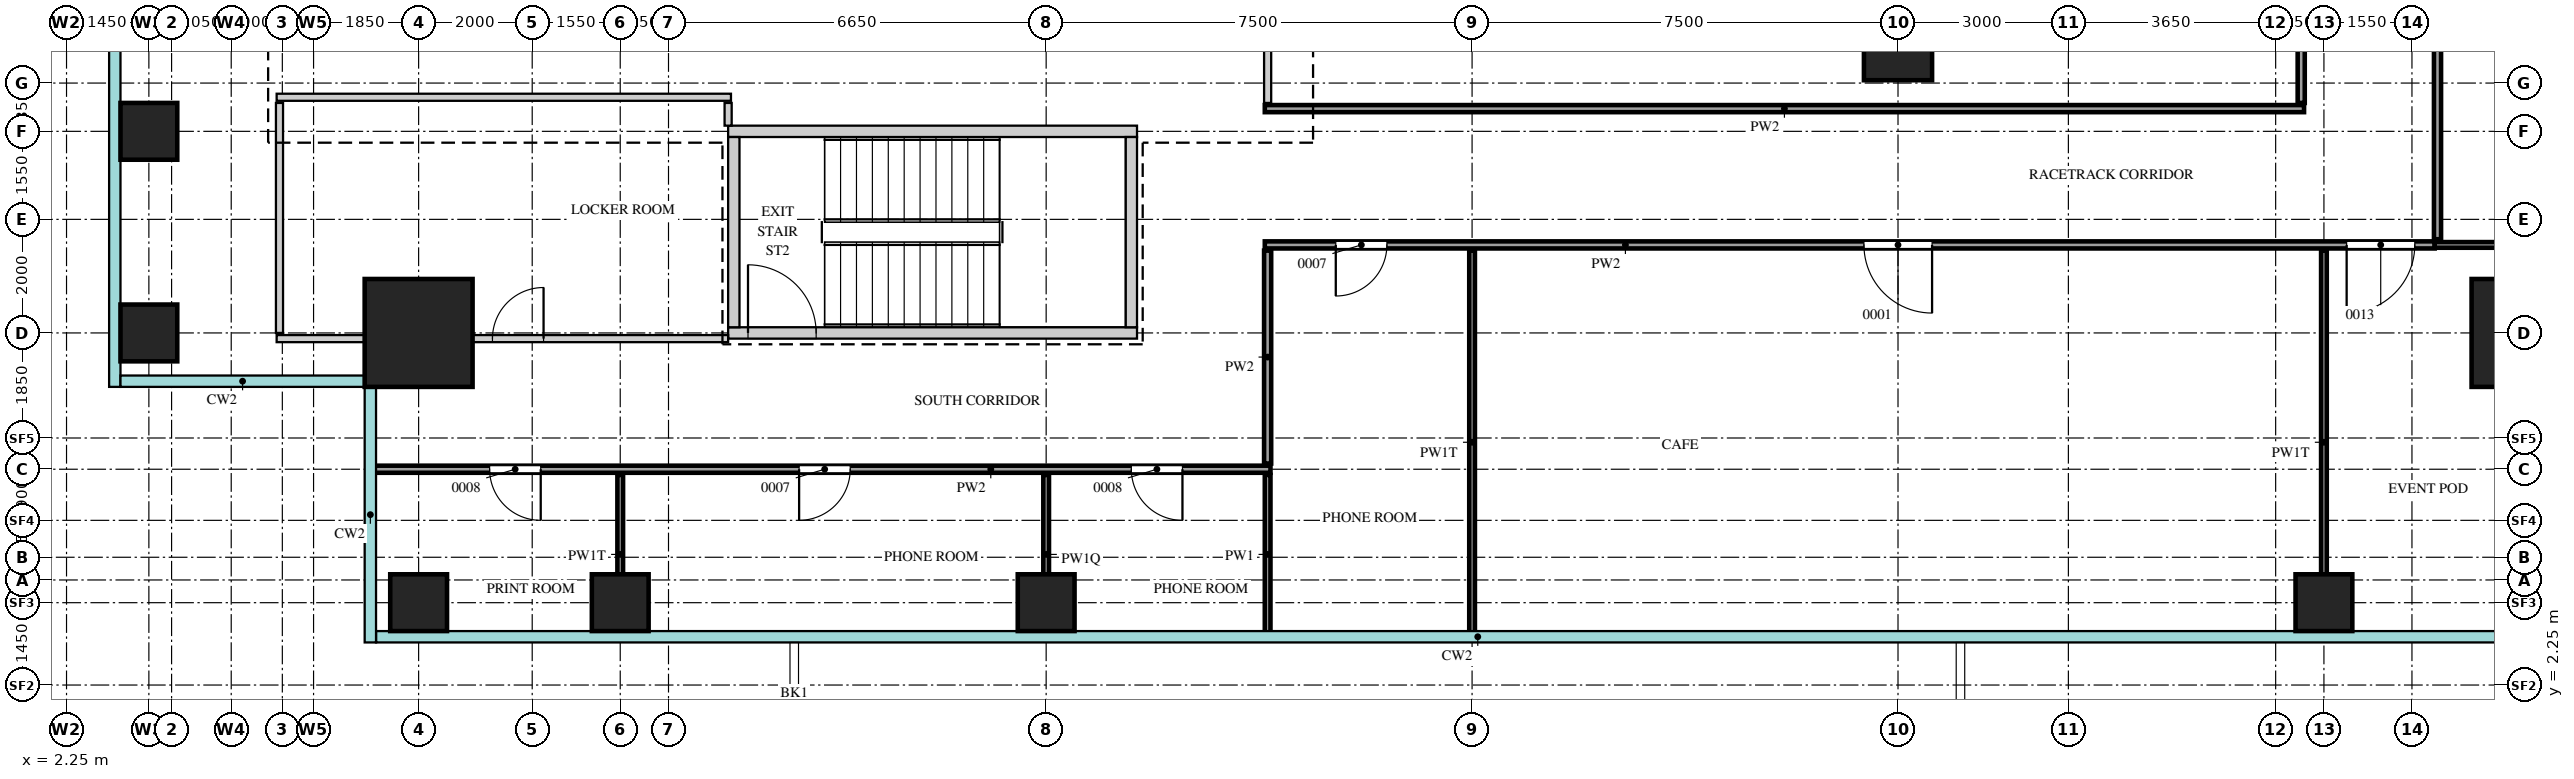
"""IFC4 building model, lengths in metres.
Left out: names, types, materials, properties, quantities, classifications, styles, units other than length and angle.
Written with IfcOpenShell. Run it as: python <this file> out.ifc"""

import sys

from ifc_helpers import new_model, si_unit, direction, frame, frame_2d, origin, origin_2d, place, context, subcontext, project, spatial, rectangle, extrude, source, transform, mapped, element, fill, save


model = new_model("IFC4")
c1 = context("Model", 3, precision=1e-05, world=origin(), true_north=direction((0.0, 1.0)))
c2 = subcontext(c1, "Body", "Model", "MODEL_VIEW")
j1 = project(units=[si_unit("LENGTHUNIT", "METRE"), si_unit("PLANEANGLEUNIT", "RADIAN")], contexts=[c1])
p1 = place(None, origin())
s1 = spatial("IfcSite", under=j1, at=p1, CompositionType="ELEMENT")
p2 = place(p1, origin())
s2 = spatial("IfcBuilding", under=s1, at=p2, CompositionType="ELEMENT")
p3 = place(p2, frame((0.0, 0.0, 192.7)))
s3 = spatial("IfcBuildingStorey", under=s2, at=p3, CompositionType="ELEMENT", Elevation=192.7)
m1 = source(origin(), c2, "Body", "SweptSolid", [
    extrude(rectangle(XDim=7.2, YDim=0.2, at=frame_2d((3.6, 0.0))), origin(), (0.0, 0.0, 1.0), 3.75),
])
p4 = place(p3, frame((13.9, 12.0, 0.0), z_axis=(0.0, 0.0, 1.0), x_axis=(1.0, 0.0, 0.0)))
e1 = element("IfcWall", 1, at=p4, inside=s3, PredefinedType="SHEAR", context=c2, shape_type="MappedRepresentation", body=[
    mapped(m1, transform((0.0, 0.0, 0.0))),
])
p5 = place(p3, frame((13.9, 8.45, 0.0), z_axis=(0.0, 0.0, 1.0), x_axis=(1.0, 0.0, 0.0)))
e2 = element("IfcWall", 2, at=p5, inside=s3, PredefinedType="SHEAR", context=c2, shape_type="MappedRepresentation", body=[
    mapped(m1, transform((0.0, 0.0, 0.0))),
])
m2 = source(origin(), c2, "Body", "SweptSolid", [
    extrude(rectangle(XDim=1.2, YDim=2.1, at=frame_2d((0.6, 1.05))), frame((0.0, 0.11, 0.0), z_axis=(0.0, -1.0, 0.0), x_axis=(1.0, 0.0, 0.0)), (0.0, 0.0, 1.0), 0.22),
])
p6 = place(p5, frame((0.35, 0.0, 0.0)))
e3 = element("IfcOpeningElement", 3, at=p6, cuts=e2, PredefinedType="OPENING", context=c2, shape_type="MappedRepresentation", body=[
    mapped(m2, transform((0.0, 0.0, 0.0))),
])
m3 = source(origin(), c2, "Body", "SweptSolid", [
    extrude(rectangle(XDim=3.35, YDim=0.2, at=frame_2d((1.675, 0.0))), origin(), (0.0, 0.0, 1.0), 3.75),
])
for number, where, z_axis, x_axis in (
    (4, (21.0, 8.55, 0.0), (0.0, 0.0, 1.0), (0.0, 1.0, 0.0)),
    (5, (14.0, 8.55, 0.0), (0.0, 0.0, 1.0), (0.0, 1.0, 0.0)),
):
    element("IfcWall", number, at=place(p3, frame(where, z_axis=z_axis, x_axis=x_axis)), inside=s3, PredefinedType="SHEAR", context=c2, shape_type="MappedRepresentation", body=[
        mapped(m3, transform((0.0, 0.0, 0.0))),
    ])
m4 = source(origin(), c2, "Body", "SweptSolid", [
    extrude(rectangle(XDim=1.9, YDim=1.9, at=origin_2d()), origin(), (0.0, 0.0, 1.0), 4.0),
])
for number, where, z_axis, x_axis in (
    (6, (45.55, 8.45, 0.0), (0.0, 0.0, 1.0), (1.0, 0.0, 0.0)),
    (7, (8.45, 8.45, 0.0), (0.0, 0.0, 1.0), (1.0, 0.0, 0.0)),
):
    element("IfcColumn", number, at=place(p3, frame(where, z_axis=z_axis, x_axis=x_axis)), inside=s3, PredefinedType="COLUMN", context=c2, shape_type="MappedRepresentation", body=[
        mapped(m4, transform((0.0, 0.0, 0.0))),
    ])
m5 = source(origin(), c2, "Body", "SweptSolid", [
    extrude(rectangle(XDim=1.0, YDim=1.0, at=origin_2d()), origin(), (0.0, 0.0, 1.0), 3.75),
])
for number, where, z_axis, x_axis in (
    (8, (8.45, 3.7, 0.0), (0.0, 0.0, 1.0), (1.0, 0.0, 0.0)),
    (9, (12.0, 3.7, 0.0), (0.0, 0.0, 1.0), (1.0, 0.0, 0.0)),
    (10, (19.5, 3.7, 0.0), (0.0, 0.0, 1.0), (1.0, 0.0, 0.0)),
    (11, (42.0, 3.7, 0.0), (0.0, 0.0, 1.0), (1.0, 0.0, 0.0)),
    (12, (3.7, 8.45, 0.0), (0.0, 0.0, 1.0), (1.0, 0.0, 0.0)),
    (13, (3.7, 12.0, 0.0), (0.0, 0.0, 1.0), (1.0, 0.0, 0.0)),
):
    element("IfcColumn", number, at=place(p3, frame(where, z_axis=z_axis, x_axis=x_axis)), inside=s3, PredefinedType="COLUMN", context=c2, shape_type="MappedRepresentation", body=[
        mapped(m5, transform((0.0, 0.0, 0.0))),
    ])
m6 = source(origin(), c2, "Body", "SweptSolid", [
    extrude(rectangle(XDim=1.2, YDim=1.2, at=origin_2d()), origin(), (0.0, 0.0, 1.0), 3.75),
])
p7 = place(p3, frame((34.5, 13.5, 0.0), z_axis=(0.0, 0.0, 1.0), x_axis=(1.0, 0.0, 0.0)))
e14 = element("IfcColumn", 14, at=p7, inside=s3, PredefinedType="COLUMN", context=c2, shape_type="MappedRepresentation", body=[
    mapped(m6, transform((0.0, 0.0, 0.0))),
])
m7 = source(origin(), c2, "Body", "SweptSolid", [
    extrude(rectangle(XDim=2.8, YDim=0.1, at=frame_2d((1.4, 0.0))), origin(), (0.0, 0.0, 1.0), 3.3),
])
p8 = place(p3, frame((12.0, 3.15, 0.0), z_axis=(0.0, 0.0, 1.0), x_axis=(0.0, 1.0, 0.0)))
e15 = element("IfcWall", 15, at=p8, inside=s3, PredefinedType="PARTITIONING", context=c2, shape_type="MappedRepresentation", body=[
    mapped(m7, transform((0.0, 0.0, 0.0))),
])
m8 = source(origin(), c2, "Body", "SweptSolid", [
    extrude(rectangle(XDim=2.8, YDim=0.1, at=frame_2d((1.4, 0.0))), origin(), (0.0, 0.0, 1.0), 3.42),
])
p9 = place(p3, frame((19.5, 3.15, 0.0), z_axis=(0.0, 0.0, 1.0), x_axis=(0.0, 1.0, 0.0)))
e16 = element("IfcWall", 16, at=p9, inside=s3, PredefinedType="PARTITIONING", context=c2, shape_type="MappedRepresentation", body=[
    mapped(m8, transform((0.0, 0.0, 0.0))),
])
m9 = source(origin(), c2, "Body", "SweptSolid", [
    extrude(rectangle(XDim=2.8, YDim=0.1, at=frame_2d((1.4, 0.0))), origin(), (0.0, 0.0, 1.0), 3.8),
])
p10 = place(p3, frame((23.4, 3.15, 0.0), z_axis=(0.0, 0.0, 1.0), x_axis=(0.0, 1.0, 0.0)))
e17 = element("IfcWall", 17, at=p10, inside=s3, PredefinedType="PARTITIONING", context=c2, shape_type="MappedRepresentation", body=[
    mapped(m9, transform((0.0, 0.0, 0.0))),
])
m10 = source(origin(), c2, "Body", "SweptSolid", [
    extrude(rectangle(XDim=6.75, YDim=0.1, at=frame_2d((3.375, 0.0))), origin(), (0.0, 0.0, 1.0), 3.3),
])
for number, where, z_axis, x_axis in (
    (18, (27.0, 3.15, 0.0), (0.0, 0.0, 1.0), (0.0, 1.0, 0.0)),
    (19, (42.0, 3.15, 0.0), (0.0, 0.0, 1.0), (0.0, 1.0, 0.0)),
):
    element("IfcWall", number, at=place(p3, frame(where, z_axis=z_axis, x_axis=x_axis)), inside=s3, PredefinedType="PARTITIONING", context=c2, shape_type="MappedRepresentation", body=[
        mapped(m10, transform((0.0, 0.0, 0.0))),
    ])
m11 = source(origin(), c2, "Body", "SweptSolid", [
    extrude(rectangle(XDim=15.8, YDim=0.125, at=frame_2d((7.9, 0.0))), origin(), (0.0, 0.0, 1.0), 3.8),
])
p11 = place(p3, frame((7.65, 6.05, 0.0), z_axis=(0.0, 0.0, 1.0), x_axis=(1.0, 0.0, 0.0)))
e20 = element("IfcWall", 20, at=p11, inside=s3, PredefinedType="PARTITIONING", context=c2, shape_type="MappedRepresentation", body=[
    mapped(m11, transform((0.0, 0.0, 0.0))),
])
m12 = source(origin(), c2, "Body", "SweptSolid", [
    extrude(rectangle(XDim=0.9, YDim=2.1, at=frame_2d((0.45, 1.05))), frame((0.0, 0.073, 0.0), z_axis=(0.0, -1.0, 0.0), x_axis=(1.0, 0.0, 0.0)), (0.0, 0.0, 1.0), 0.145),
])
p12 = place(p11, frame((2.05, 0.0, 0.0)))
e21 = element("IfcOpeningElement", 21, at=p12, cuts=e20, PredefinedType="OPENING", context=c2, shape_type="MappedRepresentation", body=[
    mapped(m12, transform((0.0, 0.0, 0.0))),
])
p13 = place(p11, frame((7.5, 0.0, 0.0)))
e22 = element("IfcOpeningElement", 22, at=p13, cuts=e20, PredefinedType="OPENING", context=c2, shape_type="MappedRepresentation", body=[
    mapped(m12, transform((0.0, 0.0, 0.0))),
])
p14 = place(p11, frame((13.35, 0.0, 0.0)))
e23 = element("IfcOpeningElement", 23, at=p14, cuts=e20, PredefinedType="OPENING", context=c2, shape_type="MappedRepresentation", body=[
    mapped(m12, transform((0.0, 0.0, 0.0))),
])
m13 = source(origin(), c2, "Body", "SweptSolid", [
    extrude(rectangle(XDim=3.75, YDim=0.125, at=frame_2d((1.875, 0.0))), origin(), (0.0, 0.0, 1.0), 3.8),
])
p15 = place(p3, frame((23.4, 6.15, 0.0), z_axis=(0.0, 0.0, 1.0), x_axis=(0.0, 1.0, 0.0)))
e24 = element("IfcWall", 24, at=p15, inside=s3, PredefinedType="PARTITIONING", context=c2, shape_type="MappedRepresentation", body=[
    mapped(m13, transform((0.0, 0.0, 0.0))),
])
m14 = source(origin(), c2, "Body", "SweptSolid", [
    extrude(rectangle(XDim=7.95, YDim=0.125, at=frame_2d((3.975, 0.0))), origin(), (0.0, 0.0, 1.0), 3.25),
])
p16 = place(p3, frame((5.95, 8.35, 0.0), z_axis=(0.0, 0.0, 1.0), x_axis=(1.0, 0.0, 0.0)))
e25 = element("IfcWall", 25, at=p16, inside=s3, PredefinedType="PARTITIONING", context=c2, shape_type="MappedRepresentation", body=[
    mapped(m14, transform((0.0, 0.0, 0.0))),
])
p17 = place(p16, frame((3.8, 0.0, 0.0)))
e26 = element("IfcOpeningElement", 26, at=p17, cuts=e25, PredefinedType="OPENING", context=c2, shape_type="MappedRepresentation", body=[
    mapped(m12, transform((0.0, 0.0, 0.0))),
])
m15 = source(origin(), c2, "Body", "SweptSolid", [
    extrude(rectangle(XDim=4.05, YDim=0.125, at=frame_2d((2.025, 0.0))), origin(), (0.0, 0.0, 1.0), 3.8),
])
p18 = place(p3, frame((6.0, 8.45, 0.0), z_axis=(0.0, 0.0, 1.0), x_axis=(0.0, 1.0, 0.0)))
e27 = element("IfcWall", 27, at=p18, inside=s3, PredefinedType="PARTITIONING", context=c2, shape_type="MappedRepresentation", body=[
    mapped(m15, transform((0.0, 0.0, 0.0))),
])
m16 = source(origin(), c2, "Body", "SweptSolid", [
    extrude(rectangle(XDim=20.6, YDim=0.125, at=frame_2d((10.3, 0.0))), origin(), (0.0, 0.0, 1.0), 3.8),
])
p19 = place(p3, frame((23.35, 10.0, 0.0), z_axis=(0.0, 0.0, 1.0), x_axis=(1.0, 0.0, 0.0)))
e28 = element("IfcWall", 28, at=p19, inside=s3, PredefinedType="PARTITIONING", context=c2, shape_type="MappedRepresentation", body=[
    mapped(m16, transform((0.0, 0.0, 0.0))),
])
p20 = place(p19, frame((1.25, 0.0, 0.0)))
e29 = element("IfcOpeningElement", 29, at=p20, cuts=e28, PredefinedType="OPENING", context=c2, shape_type="MappedRepresentation", body=[
    mapped(m12, transform((0.0, 0.0, 0.0))),
])
m17 = source(origin(), c2, "Body", "SweptSolid", [
    extrude(rectangle(XDim=1.2, YDim=2.1, at=frame_2d((0.6, 1.05))), frame((0.0, 0.073, 0.0), z_axis=(0.0, -1.0, 0.0), x_axis=(1.0, 0.0, 0.0)), (0.0, 0.0, 1.0), 0.145),
])
p21 = place(p19, frame((10.55, 0.0, 0.0)))
e30 = element("IfcOpeningElement", 30, at=p21, cuts=e28, PredefinedType="OPENING", context=c2, shape_type="MappedRepresentation", body=[
    mapped(m17, transform((0.0, 0.0, 0.0))),
])
p22 = place(p19, frame((19.05, 0.0, 0.0)))
e31 = element("IfcOpeningElement", 31, at=p22, cuts=e28, PredefinedType="OPENING", context=c2, shape_type="MappedRepresentation", body=[
    mapped(m17, transform((0.0, 0.0, 0.0))),
])
m18 = source(origin(), c2, "Body", "SweptSolid", [
    extrude(rectangle(XDim=6.9, YDim=0.1, at=frame_2d((3.45, 0.0))), origin(), (0.0, 0.0, 1.0), 3.8),
])
p23 = place(p3, frame((43.95, 10.0, 0.0), z_axis=(0.0, 0.0, 1.0), x_axis=(1.0, 0.0, 0.0)))
e32 = element("IfcWall", 32, at=p23, inside=s3, PredefinedType="PARTITIONING", context=c2, shape_type="MappedRepresentation", body=[
    mapped(m18, transform((0.0, 0.0, 0.0))),
])
m19 = source(origin(), c2, "Body", "SweptSolid", [
    extrude(rectangle(XDim=33.8, YDim=0.125, at=frame_2d((16.9, 0.0))), origin(), (0.0, 0.0, 1.0), 3.8),
])
p24 = place(p3, frame((44.0, 10.1, 0.0), z_axis=(0.0, 0.0, 1.0), x_axis=(0.0, 1.0, 0.0)))
e33 = element("IfcWall", 33, at=p24, inside=s3, PredefinedType="PARTITIONING", context=c2, shape_type="MappedRepresentation", body=[
    mapped(m19, transform((0.0, 0.0, 0.0))),
])
p25 = place(p24, frame((5.25, 0.0, 0.0)))
e34 = element("IfcOpeningElement", 34, at=p25, cuts=e33, PredefinedType="OPENING", context=c2, shape_type="MappedRepresentation", body=[
    mapped(m12, transform((0.0, 0.0, 0.0))),
])
p26 = place(p24, frame((12.55, 0.0, 0.0)))
e35 = element("IfcOpeningElement", 35, at=p26, cuts=e33, PredefinedType="OPENING", context=c2, shape_type="MappedRepresentation", body=[
    mapped(m12, transform((0.0, 0.0, 0.0))),
])
p27 = place(p24, frame((23.6, 0.0, 0.0)))
e36 = element("IfcOpeningElement", 36, at=p27, cuts=e33, PredefinedType="OPENING", context=c2, shape_type="MappedRepresentation", body=[
    mapped(m12, transform((0.0, 0.0, 0.0))),
])
p28 = place(p24, frame((32.3, 0.0, 0.0)))
e37 = element("IfcOpeningElement", 37, at=p28, cuts=e33, PredefinedType="OPENING", context=c2, shape_type="MappedRepresentation", body=[
    mapped(m12, transform((0.0, 0.0, 0.0))),
])
m20 = source(origin(), c2, "Body", "SweptSolid", [
    extrude(rectangle(XDim=0.4, YDim=0.125, at=frame_2d((0.2, 0.0))), origin(), (0.0, 0.0, 1.0), 3.8),
])
p29 = place(p3, frame((13.9, 12.1, 0.0), z_axis=(0.0, 0.0, 1.0), x_axis=(0.0, 1.0, 0.0)))
e38 = element("IfcWall", 38, at=p29, inside=s3, PredefinedType="PARTITIONING", context=c2, shape_type="MappedRepresentation", body=[
    mapped(m20, transform((0.0, 0.0, 0.0))),
])
m21 = source(origin(), c2, "Body", "SweptSolid", [
    extrude(rectangle(XDim=18.3, YDim=0.125, at=frame_2d((9.15, 0.0))), origin(), (0.0, 0.0, 1.0), 3.8),
])
p30 = place(p3, frame((23.35, 12.4, 0.0), z_axis=(0.0, 0.0, 1.0), x_axis=(1.0, 0.0, 0.0)))
e39 = element("IfcWall", 39, at=p30, inside=s3, PredefinedType="PARTITIONING", context=c2, shape_type="MappedRepresentation", body=[
    mapped(m21, transform((0.0, 0.0, 0.0))),
])
m22 = source(origin(), c2, "Body", "SweptSolid", [
    extrude(rectangle(XDim=23.4, YDim=0.125, at=frame_2d((11.7, 0.0))), origin(), (0.0, 0.0, 1.0), 3.8),
])
p31 = place(p3, frame((23.4, 12.5, 0.0), z_axis=(0.0, 0.0, 1.0), x_axis=(0.0, 1.0, 0.0)))
e40 = element("IfcWall", 40, at=p31, inside=s3, PredefinedType="PARTITIONING", context=c2, shape_type="MappedRepresentation", body=[
    mapped(m22, transform((0.0, 0.0, 0.0))),
])
p32 = place(p31, frame((6.6, 0.0, 0.0)))
e41 = element("IfcOpeningElement", 41, at=p32, cuts=e40, PredefinedType="OPENING", context=c2, shape_type="MappedRepresentation", body=[
    mapped(m17, transform((0.0, 0.0, 0.0))),
])
m23 = source(origin(), c2, "Body", "SweptSolid", [
    extrude(rectangle(XDim=29.0, YDim=0.125, at=frame_2d((14.5, 0.0))), origin(), (0.0, 0.0, 1.0), 3.8),
])
p33 = place(p3, frame((41.6, 12.5, 0.0), z_axis=(0.0, 0.0, 1.0), x_axis=(0.0, 1.0, 0.0)))
e42 = element("IfcWall", 42, at=p33, inside=s3, PredefinedType="PARTITIONING", context=c2, shape_type="MappedRepresentation", body=[
    mapped(m23, transform((0.0, 0.0, 0.0))),
])
p34 = place(p33, frame((18.4, 0.0, 0.0)))
e43 = element("IfcOpeningElement", 43, at=p34, cuts=e42, PredefinedType="OPENING", context=c2, shape_type="MappedRepresentation", body=[
    mapped(m17, transform((0.0, 0.0, 0.0))),
])
m24 = source(origin(), c2, "Body", "SweptSolid", [
    extrude(rectangle(XDim=8.0, YDim=0.125, at=frame_2d((4.0, 0.0))), origin(), (0.0, 0.0, 1.0), 3.8),
])
p35 = place(p3, frame((5.95, 12.6, 0.0), z_axis=(0.0, 0.0, 1.0), x_axis=(1.0, 0.0, 0.0)))
e44 = element("IfcWall", 44, at=p35, inside=s3, PredefinedType="PARTITIONING", context=c2, shape_type="MappedRepresentation", body=[
    mapped(m24, transform((0.0, 0.0, 0.0))),
])
m25 = source(origin(), c2, "Body", "SweptSolid", [
    extrude(rectangle(XDim=0.9, YDim=2.1, at=frame_2d((0.45, 1.05))), frame((0.0, 0.025, 0.0), z_axis=(0.0, -1.0, 0.0), x_axis=(1.0, 0.0, 0.0)), (0.0, 0.0, 1.0), 0.05),
])
p36 = place(p20, origin())
e45 = element("IfcDoor", 45, at=p36, inside=s3, OperationType="SINGLE_SWING_LEFT", PredefinedType="DOOR", context=c2, shape_type="MappedRepresentation", body=[
    mapped(m25, transform((0.0, 0.0, 0.0))),
])
fill(e29, e45)
m26 = source(origin(), c2, "Body", "SweptSolid", [
    extrude(rectangle(XDim=1.2, YDim=2.1, at=frame_2d((0.6, 1.05))), frame((0.0, 0.025, 0.0), z_axis=(0.0, -1.0, 0.0), x_axis=(1.0, 0.0, 0.0)), (0.0, 0.0, 1.0), 0.05),
])
p37 = place(p21, origin())
e46 = element("IfcDoor", 46, at=p37, inside=s3, OperationType="SINGLE_SWING_RIGHT", PredefinedType="DOOR", context=c2, shape_type="MappedRepresentation", body=[
    mapped(m26, transform((0.0, 0.0, 0.0))),
])
fill(e30, e46)
p38 = place(p22, origin())
e47 = element("IfcDoor", 47, at=p38, inside=s3, OperationType="SINGLE_SWING_LEFT", PredefinedType="DOOR", context=c2, shape_type="MappedRepresentation", body=[
    mapped(m26, transform((0.0, 0.0, 0.0))),
])
fill(e31, e47)
p39 = place(p17, origin())
e48 = element("IfcDoor", 48, at=p39, inside=s3, OperationType="SINGLE_SWING_LEFT", PredefinedType="DOOR", context=c2, shape_type="MappedRepresentation", body=[
    mapped(m25, transform((0.0, 0.0, 0.0))),
])
fill(e26, e48)
p40 = place(p12, origin())
e49 = element("IfcDoor", 49, at=p40, inside=s3, OperationType="SINGLE_SWING_RIGHT", PredefinedType="DOOR", context=c2, shape_type="MappedRepresentation", body=[
    mapped(m25, transform((0.0, 0.0, 0.0))),
])
fill(e21, e49)
p41 = place(p13, origin())
e50 = element("IfcDoor", 50, at=p41, inside=s3, OperationType="SINGLE_SWING_LEFT", PredefinedType="DOOR", context=c2, shape_type="MappedRepresentation", body=[
    mapped(m25, transform((0.0, 0.0, 0.0))),
])
fill(e22, e50)
p42 = place(p14, origin())
e51 = element("IfcDoor", 51, at=p42, inside=s3, OperationType="SINGLE_SWING_RIGHT", PredefinedType="DOOR", context=c2, shape_type="MappedRepresentation", body=[
    mapped(m25, transform((0.0, 0.0, 0.0))),
])
fill(e23, e51)
p43 = place(p6, origin())
e52 = element("IfcDoor", 52, at=p43, inside=s3, OperationType="SINGLE_SWING_RIGHT", PredefinedType="DOOR", context=c2, shape_type="MappedRepresentation", body=[
    mapped(m26, transform((0.0, 0.0, 0.0))),
])
fill(e3, e52)
save(model, sys.argv[1])
